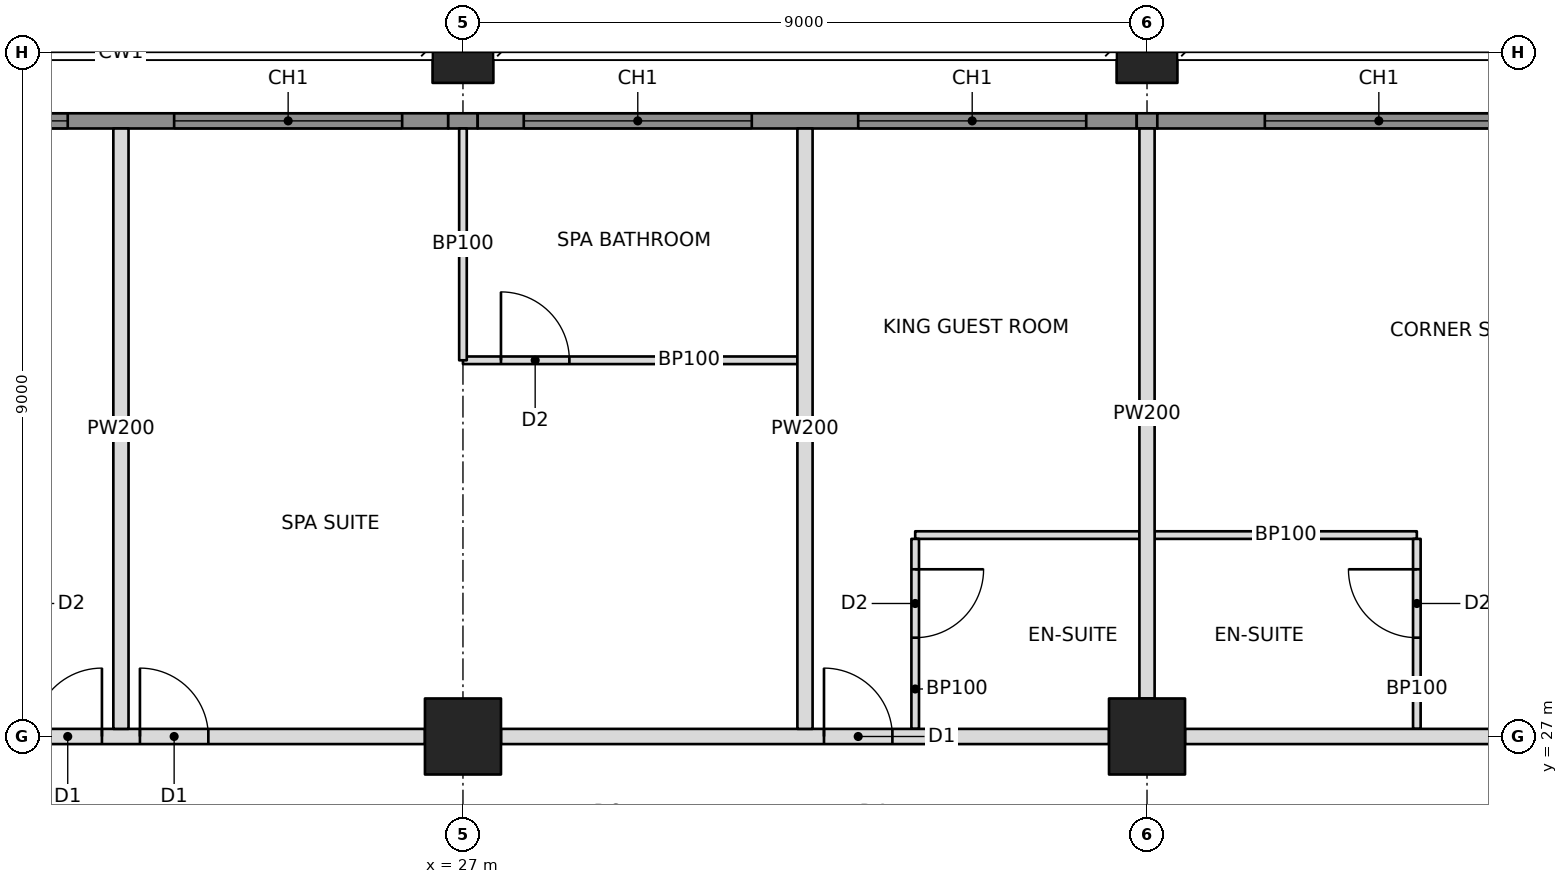
"""IFC4 building model, lengths in metres.
Left out: names, types, materials, properties, quantities, classifications, styles, units other than length and angle.
Written with IfcOpenShell. Run it as: python <this file> out.ifc"""

import sys

from ifc_helpers import new_model, si_unit, direction, frame, frame_2d, origin, origin_2d, place, context, subcontext, project, spatial, rectangle, hollow_rectangle, extrude, element, fill, save


model = new_model("IFC4")
c1 = context("Model", 3, precision=1e-05, world=origin(), true_north=direction((0.0, 1.0)))
c2 = subcontext(c1, "Body", "Model", "MODEL_VIEW")
j1 = project(units=[si_unit("LENGTHUNIT", "METRE"), si_unit("PLANEANGLEUNIT", "RADIAN")], contexts=[c1])
p1 = place(None, origin())
s1 = spatial("IfcSite", under=j1, at=p1, CompositionType="ELEMENT")
p2 = place(p1, origin())
s2 = spatial("IfcBuilding", under=s1, at=p2, CompositionType="ELEMENT")
p3 = place(p2, frame((0.0, 0.0, 97.6)))
s3 = spatial("IfcBuildingStorey", under=s2, at=p3, CompositionType="ELEMENT", Elevation=97.6)
p4 = place(p3, frame((27.0, 27.0, 0.0), z_axis=(0.0, 0.0, 1.0), x_axis=(1.0, 0.0, 0.0)))
e1 = element("IfcColumn", 1, at=p4, inside=s3, PredefinedType="COLUMN", context=c2, shape_type="SweptSolid", body=[
    extrude(hollow_rectangle(XDim=1.0, YDim=1.0, WallThickness=0.1, at=origin_2d()), origin(), (0.0, 0.0, 1.0), 3.4),
])
p5 = place(p3, frame((27.0, 36.0, 0.0), z_axis=(0.0, 0.0, 1.0), x_axis=(1.0, 0.0, 0.0)))
e2 = element("IfcColumn", 2, at=p5, inside=s3, PredefinedType="COLUMN", context=c2, shape_type="SweptSolid", body=[
    extrude(hollow_rectangle(XDim=0.8, YDim=0.8, WallThickness=0.07, at=origin_2d()), origin(), (0.0, 0.0, 1.0), 3.4),
])
p6 = place(p3, frame((36.0, 27.0, 0.0), z_axis=(0.0, 0.0, 1.0), x_axis=(1.0, 0.0, 0.0)))
e3 = element("IfcColumn", 3, at=p6, inside=s3, PredefinedType="COLUMN", context=c2, shape_type="SweptSolid", body=[
    extrude(hollow_rectangle(XDim=1.0, YDim=1.0, WallThickness=0.1, at=origin_2d()), origin(), (0.0, 0.0, 1.0), 3.4),
])
p7 = place(p3, frame((36.0, 36.0, 0.0), z_axis=(0.0, 0.0, 1.0), x_axis=(1.0, 0.0, 0.0)))
e4 = element("IfcColumn", 4, at=p7, inside=s3, PredefinedType="COLUMN", context=c2, shape_type="SweptSolid", body=[
    extrude(hollow_rectangle(XDim=0.8, YDim=0.8, WallThickness=0.07, at=origin_2d()), origin(), (0.0, 0.0, 1.0), 3.4),
])
p8 = place(p3, frame((18.5, 27.0, 0.0), z_axis=(0.0, 0.0, 1.0), x_axis=(1.0, 0.0, 0.0)))
e5 = element("IfcWall", 5, at=p8, inside=s3, PredefinedType="PARTITIONING", context=c2, shape_type="SweptSolid", body=[
    extrude(rectangle(XDim=8.0, YDim=0.2, at=frame_2d((4.0, 0.0))), origin(), (0.0, 0.0, 1.0), 2.405),
])
p9 = place(p8, frame((2.85, 0.0, 0.0)))
e6 = element("IfcOpeningElement", 6, at=p9, cuts=e5, PredefinedType="OPENING", context=c2, shape_type="SweptSolid", body=[
    extrude(rectangle(XDim=0.9, YDim=2.1, at=frame_2d((0.45, 1.05))), frame((0.0, 0.11, 0.0), z_axis=(0.0, -1.0, 0.0), x_axis=(1.0, 0.0, 0.0)), (0.0, 0.0, 1.0), 0.22),
])
p10 = place(p8, frame((4.25, 0.0, 0.0)))
e7 = element("IfcOpeningElement", 7, at=p10, cuts=e5, PredefinedType="OPENING", context=c2, shape_type="SweptSolid", body=[
    extrude(rectangle(XDim=0.9, YDim=2.1, at=frame_2d((0.45, 1.05))), frame((0.0, 0.11, 0.0), z_axis=(0.0, -1.0, 0.0), x_axis=(1.0, 0.0, 0.0)), (0.0, 0.0, 1.0), 0.22),
])
p11 = place(p3, frame((27.5, 27.0, 0.0), z_axis=(0.0, 0.0, 1.0), x_axis=(1.0, 0.0, 0.0)))
e8 = element("IfcWall", 8, at=p11, inside=s3, PredefinedType="PARTITIONING", context=c2, shape_type="SweptSolid", body=[
    extrude(rectangle(XDim=8.0, YDim=0.2, at=frame_2d((4.0, 0.0))), origin(), (0.0, 0.0, 1.0), 2.405),
])
p12 = place(p11, frame((4.25, 0.0, 0.0)))
e9 = element("IfcOpeningElement", 9, at=p12, cuts=e8, PredefinedType="OPENING", context=c2, shape_type="SweptSolid", body=[
    extrude(rectangle(XDim=0.9, YDim=2.1, at=frame_2d((0.45, 1.05))), frame((0.0, 0.11, 0.0), z_axis=(0.0, -1.0, 0.0), x_axis=(1.0, 0.0, 0.0)), (0.0, 0.0, 1.0), 0.22),
])
p13 = place(p3, frame((36.5, 27.0, 0.0), z_axis=(0.0, 0.0, 1.0), x_axis=(1.0, 0.0, 0.0)))
e10 = element("IfcWall", 10, at=p13, inside=s3, PredefinedType="PARTITIONING", context=c2, shape_type="SweptSolid", body=[
    extrude(rectangle(XDim=7.5, YDim=0.2, at=frame_2d((3.75, 0.0))), origin(), (0.0, 0.0, 1.0), 2.438),
])
p14 = place(p13, frame((6.35, 0.0, 0.0)))
e11 = element("IfcOpeningElement", 11, at=p14, cuts=e10, PredefinedType="OPENING", context=c2, shape_type="SweptSolid", body=[
    extrude(rectangle(XDim=0.9, YDim=2.1, at=frame_2d((0.45, 1.05))), frame((0.0, 0.11, 0.0), z_axis=(0.0, -1.0, 0.0), x_axis=(1.0, 0.0, 0.0)), (0.0, 0.0, 1.0), 0.22),
])
for number, where, z_axis, x_axis in (
    (12, (22.5, 27.1, 0.0), (0.0, 0.0, 1.0), (0.0, 1.0, 0.0)),
    (13, (31.5, 27.1, 0.0), (0.0, 0.0, 1.0), (0.0, 1.0, 0.0)),
):
    element("IfcWall", number, at=place(p3, frame(where, z_axis=z_axis, x_axis=x_axis)), inside=s3, PredefinedType="PARTITIONING", context=c2, shape_type="SweptSolid", body=[
        extrude(rectangle(XDim=7.9, YDim=0.2, at=frame_2d((3.95, 0.0))), origin(), (0.0, 0.0, 1.0), 2.404),
    ])
p15 = place(p3, frame((36.0, 27.5, 0.0), z_axis=(0.0, 0.0, 1.0), x_axis=(0.0, 1.0, 0.0)))
e14 = element("IfcWall", 14, at=p15, inside=s3, PredefinedType="PARTITIONING", context=c2, shape_type="SweptSolid", body=[
    extrude(rectangle(XDim=7.5, YDim=0.2, at=frame_2d((3.75, 0.0))), origin(), (0.0, 0.0, 1.0), 2.438),
])
p16 = place(p3, frame((27.0, 31.95, 0.0), z_axis=(0.0, 0.0, 1.0), x_axis=(1.0, 0.0, 0.0)))
e15 = element("IfcWall", 15, at=p16, inside=s3, PredefinedType="PARTITIONING", context=c2, shape_type="SweptSolid", body=[
    extrude(rectangle(XDim=4.4, YDim=0.1, at=frame_2d((2.2, 0.0))), origin(), (0.0, 0.0, 1.0), 2.404),
])
p17 = place(p16, frame((0.5, 0.0, 0.0)))
e16 = element("IfcOpeningElement", 16, at=p17, cuts=e15, PredefinedType="OPENING", context=c2, shape_type="SweptSolid", body=[
    extrude(rectangle(XDim=0.9, YDim=2.1, at=frame_2d((0.45, 1.05))), frame((0.0, 0.06, 0.0), z_axis=(0.0, -1.0, 0.0), x_axis=(1.0, 0.0, 0.0)), (0.0, 0.0, 1.0), 0.12),
])
p18 = place(p3, frame((27.0, 31.95, 0.0), z_axis=(0.0, 0.0, 1.0), x_axis=(0.0, 1.0, 0.0)))
e17 = element("IfcWall", 17, at=p18, inside=s3, PredefinedType="PARTITIONING", context=c2, shape_type="SweptSolid", body=[
    extrude(rectangle(XDim=3.05, YDim=0.1, at=frame_2d((1.525, 0.0))), origin(), (0.0, 0.0, 1.0), 2.405),
])
p19 = place(p3, frame((32.95, 29.65, 0.0), z_axis=(0.0, 0.0, 1.0), x_axis=(1.0, 0.0, 0.0)))
e18 = element("IfcWall", 18, at=p19, inside=s3, PredefinedType="PARTITIONING", context=c2, shape_type="SweptSolid", body=[
    extrude(rectangle(XDim=2.95, YDim=0.1, at=frame_2d((1.475, 0.0))), origin(), (0.0, 0.0, 1.0), 2.438),
])
p20 = place(p3, frame((32.95, 27.1, 0.0), z_axis=(0.0, 0.0, 1.0), x_axis=(0.0, 1.0, 0.0)))
e19 = element("IfcWall", 19, at=p20, inside=s3, PredefinedType="PARTITIONING", context=c2, shape_type="SweptSolid", body=[
    extrude(rectangle(XDim=2.5, YDim=0.1, at=frame_2d((1.25, 0.0))), origin(), (0.0, 0.0, 1.0), 2.404),
])
p21 = place(p20, frame((1.2, 0.0, 0.0)))
e20 = element("IfcOpeningElement", 20, at=p21, cuts=e19, PredefinedType="OPENING", context=c2, shape_type="SweptSolid", body=[
    extrude(rectangle(XDim=0.9, YDim=2.1, at=frame_2d((0.45, 1.05))), frame((0.0, 0.06, 0.0), z_axis=(0.0, -1.0, 0.0), x_axis=(1.0, 0.0, 0.0)), (0.0, 0.0, 1.0), 0.12),
])
p22 = place(p3, frame((36.1, 29.65, 0.0), z_axis=(0.0, 0.0, 1.0), x_axis=(1.0, 0.0, 0.0)))
e21 = element("IfcWall", 21, at=p22, inside=s3, PredefinedType="PARTITIONING", context=c2, shape_type="SweptSolid", body=[
    extrude(rectangle(XDim=3.45, YDim=0.1, at=frame_2d((1.725, 0.0))), origin(), (0.0, 0.0, 1.0), 2.438),
])
p23 = place(p3, frame((39.55, 27.1, 0.0), z_axis=(0.0, 0.0, 1.0), x_axis=(0.0, 1.0, 0.0)))
e22 = element("IfcWall", 22, at=p23, inside=s3, PredefinedType="PARTITIONING", context=c2, shape_type="SweptSolid", body=[
    extrude(rectangle(XDim=2.5, YDim=0.1, at=frame_2d((1.25, 0.0))), origin(), (0.0, 0.0, 1.0), 2.438),
])
p24 = place(p23, frame((1.2, 0.0, 0.0)))
e23 = element("IfcOpeningElement", 23, at=p24, cuts=e22, PredefinedType="OPENING", context=c2, shape_type="SweptSolid", body=[
    extrude(rectangle(XDim=0.9, YDim=2.1, at=frame_2d((0.45, 1.05))), frame((0.0, 0.06, 0.0), z_axis=(0.0, -1.0, 0.0), x_axis=(1.0, 0.0, 0.0)), (0.0, 0.0, 1.0), 0.12),
])
p25 = place(p3, frame((18.194, 35.1, 0.0), z_axis=(0.0, 0.0, 1.0), x_axis=(1.0, 0.0, 0.0)))
e24 = element("IfcWall", 24, at=p25, inside=s3, PredefinedType="SOLIDWALL", context=c2, shape_type="SweptSolid", body=[
    extrude(rectangle(XDim=8.612, YDim=0.2, at=frame_2d((4.306, 0.0))), origin(), (0.0, 0.0, 1.0), 3.2),
])
p26 = place(p25, frame((0.606, 0.0, 0.6)))
e25 = element("IfcOpeningElement", 25, at=p26, cuts=e24, PredefinedType="OPENING", context=c2, shape_type="SweptSolid", body=[
    extrude(rectangle(XDim=3.0, YDim=2.2, at=frame_2d((1.5, 1.1))), frame((0.0, 0.11, 0.0), z_axis=(0.0, -1.0, 0.0), x_axis=(1.0, 0.0, 0.0)), (0.0, 0.0, 1.0), 0.22),
])
p27 = place(p25, frame((5.006, 0.0, 0.6)))
e26 = element("IfcOpeningElement", 26, at=p27, cuts=e24, PredefinedType="OPENING", context=c2, shape_type="SweptSolid", body=[
    extrude(rectangle(XDim=3.0, YDim=2.2, at=frame_2d((1.5, 1.1))), frame((0.0, 0.11, 0.0), z_axis=(0.0, -1.0, 0.0), x_axis=(1.0, 0.0, 0.0)), (0.0, 0.0, 1.0), 0.22),
])
p28 = place(p3, frame((26.806, 35.1, 0.0), z_axis=(0.0, 0.0, 1.0), x_axis=(1.0, 0.0, 0.0)))
e27 = element("IfcWall", 27, at=p28, inside=s3, PredefinedType="SOLIDWALL", context=c2, shape_type="SweptSolid", body=[
    extrude(rectangle(XDim=0.388, YDim=0.2, at=frame_2d((0.194, 0.0))), origin(), (0.0, 0.0, 1.0), 2.404),
])
p29 = place(p3, frame((27.194, 35.1, 0.0), z_axis=(0.0, 0.0, 1.0), x_axis=(1.0, 0.0, 0.0)))
e28 = element("IfcWall", 28, at=p29, inside=s3, PredefinedType="SOLIDWALL", context=c2, shape_type="SweptSolid", body=[
    extrude(rectangle(XDim=8.671, YDim=0.2, at=frame_2d((4.335, 0.0))), origin(), (0.0, 0.0, 1.0), 3.2),
])
p30 = place(p29, frame((0.606, 0.0, 0.6)))
e29 = element("IfcOpeningElement", 29, at=p30, cuts=e28, PredefinedType="OPENING", context=c2, shape_type="SweptSolid", body=[
    extrude(rectangle(XDim=3.0, YDim=2.2, at=frame_2d((1.5, 1.1))), frame((0.0, 0.11, 0.0), z_axis=(0.0, -1.0, 0.0), x_axis=(1.0, 0.0, 0.0)), (0.0, 0.0, 1.0), 0.22),
])
p31 = place(p29, frame((5.006, 0.0, 0.6)))
e30 = element("IfcOpeningElement", 30, at=p31, cuts=e28, PredefinedType="OPENING", context=c2, shape_type="SweptSolid", body=[
    extrude(rectangle(XDim=3.0, YDim=2.2, at=frame_2d((1.5, 1.1))), frame((0.0, 0.11, 0.0), z_axis=(0.0, -1.0, 0.0), x_axis=(1.0, 0.0, 0.0)), (0.0, 0.0, 1.0), 0.22),
])
p32 = place(p3, frame((35.865, 35.1, 0.0), z_axis=(0.0, 0.0, 1.0), x_axis=(1.0, 0.0, 0.0)))
e31 = element("IfcWall", 31, at=p32, inside=s3, PredefinedType="SOLIDWALL", context=c2, shape_type="SweptSolid", body=[
    extrude(rectangle(XDim=0.271, YDim=0.2, at=frame_2d((0.135, 0.0))), origin(), (0.0, 0.0, 1.0), 2.438),
])
p33 = place(p3, frame((36.135, 35.1, 0.0), z_axis=(0.0, 0.0, 1.0), x_axis=(1.0, 0.0, 0.0)))
e32 = element("IfcWall", 32, at=p33, inside=s3, PredefinedType="SOLIDWALL", context=c2, shape_type="SweptSolid", body=[
    extrude(rectangle(XDim=5.865, YDim=0.2, at=frame_2d((2.932, 0.0))), origin(), (0.0, 0.0, 1.0), 3.2),
])
p34 = place(p33, frame((1.415, 0.0, 0.6)))
e33 = element("IfcOpeningElement", 33, at=p34, cuts=e32, PredefinedType="OPENING", context=c2, shape_type="SweptSolid", body=[
    extrude(rectangle(XDim=3.0, YDim=2.2, at=frame_2d((1.5, 1.1))), frame((0.0, 0.11, 0.0), z_axis=(0.0, -1.0, 0.0), x_axis=(1.0, 0.0, 0.0)), (0.0, 0.0, 1.0), 0.22),
])
p35 = place(p26, origin())
e34 = element("IfcWindow", 34, at=p35, inside=s3, PartitioningType="TRIPLE_PANEL_VERTICAL", PredefinedType="WINDOW", context=c2, shape_type="SweptSolid", body=[
    extrude(rectangle(XDim=3.0, YDim=2.2, at=frame_2d((1.5, 1.1))), frame((0.0, 0.03, 0.0), z_axis=(0.0, -1.0, 0.0), x_axis=(1.0, 0.0, 0.0)), (0.0, 0.0, 1.0), 0.06),
])
fill(e25, e34)
p36 = place(p27, origin())
e35 = element("IfcWindow", 35, at=p36, inside=s3, PartitioningType="TRIPLE_PANEL_VERTICAL", PredefinedType="WINDOW", context=c2, shape_type="SweptSolid", body=[
    extrude(rectangle(XDim=3.0, YDim=2.2, at=frame_2d((1.5, 1.1))), frame((0.0, 0.03, 0.0), z_axis=(0.0, -1.0, 0.0), x_axis=(1.0, 0.0, 0.0)), (0.0, 0.0, 1.0), 0.06),
])
fill(e26, e35)
p37 = place(p30, origin())
e36 = element("IfcWindow", 36, at=p37, inside=s3, PartitioningType="TRIPLE_PANEL_VERTICAL", PredefinedType="WINDOW", context=c2, shape_type="SweptSolid", body=[
    extrude(rectangle(XDim=3.0, YDim=2.2, at=frame_2d((1.5, 1.1))), frame((0.0, 0.03, 0.0), z_axis=(0.0, -1.0, 0.0), x_axis=(1.0, 0.0, 0.0)), (0.0, 0.0, 1.0), 0.06),
])
fill(e29, e36)
p38 = place(p31, origin())
e37 = element("IfcWindow", 37, at=p38, inside=s3, PartitioningType="TRIPLE_PANEL_VERTICAL", PredefinedType="WINDOW", context=c2, shape_type="SweptSolid", body=[
    extrude(rectangle(XDim=3.0, YDim=2.2, at=frame_2d((1.5, 1.1))), frame((0.0, 0.03, 0.0), z_axis=(0.0, -1.0, 0.0), x_axis=(1.0, 0.0, 0.0)), (0.0, 0.0, 1.0), 0.06),
])
fill(e30, e37)
p39 = place(p34, origin())
e38 = element("IfcWindow", 38, at=p39, inside=s3, PartitioningType="TRIPLE_PANEL_VERTICAL", PredefinedType="WINDOW", context=c2, shape_type="SweptSolid", body=[
    extrude(rectangle(XDim=3.0, YDim=2.2, at=frame_2d((1.5, 1.1))), frame((0.0, 0.03, 0.0), z_axis=(0.0, -1.0, 0.0), x_axis=(1.0, 0.0, 0.0)), (0.0, 0.0, 1.0), 0.06),
])
fill(e33, e38)
p40 = place(p9, origin())
e39 = element("IfcDoor", 39, at=p40, inside=s3, OperationType="SINGLE_SWING_RIGHT", PredefinedType="DOOR", context=c2, shape_type="SweptSolid", body=[
    extrude(rectangle(XDim=0.9, YDim=2.1, at=frame_2d((0.45, 1.05))), frame((0.0, 0.025, 0.0), z_axis=(0.0, -1.0, 0.0), x_axis=(1.0, 0.0, 0.0)), (0.0, 0.0, 1.0), 0.05),
])
fill(e6, e39)
p41 = place(p17, origin())
e40 = element("IfcDoor", 40, at=p41, inside=s3, OperationType="SINGLE_SWING_LEFT", PredefinedType="DOOR", context=c2, shape_type="SweptSolid", body=[
    extrude(rectangle(XDim=0.9, YDim=2.1, at=frame_2d((0.45, 1.05))), frame((0.0, 0.025, 0.0), z_axis=(0.0, -1.0, 0.0), x_axis=(1.0, 0.0, 0.0)), (0.0, 0.0, 1.0), 0.05),
])
fill(e16, e40)
p42 = place(p10, origin())
e41 = element("IfcDoor", 41, at=p42, inside=s3, OperationType="SINGLE_SWING_LEFT", PredefinedType="DOOR", context=c2, shape_type="SweptSolid", body=[
    extrude(rectangle(XDim=0.9, YDim=2.1, at=frame_2d((0.45, 1.05))), frame((0.0, 0.025, 0.0), z_axis=(0.0, -1.0, 0.0), x_axis=(1.0, 0.0, 0.0)), (0.0, 0.0, 1.0), 0.05),
])
fill(e7, e41)
p43 = place(p21, frame((0.9, 0.0, 0.0), z_axis=(0.0, 0.0, 1.0), x_axis=(-1.0, 0.0, 0.0)))
e42 = element("IfcDoor", 42, at=p43, inside=s3, OperationType="SINGLE_SWING_LEFT", PredefinedType="DOOR", context=c2, shape_type="SweptSolid", body=[
    extrude(rectangle(XDim=0.9, YDim=2.1, at=frame_2d((0.45, 1.05))), frame((0.0, 0.025, 0.0), z_axis=(0.0, -1.0, 0.0), x_axis=(1.0, 0.0, 0.0)), (0.0, 0.0, 1.0), 0.05),
])
fill(e20, e42)
p44 = place(p12, origin())
e43 = element("IfcDoor", 43, at=p44, inside=s3, OperationType="SINGLE_SWING_LEFT", PredefinedType="DOOR", context=c2, shape_type="SweptSolid", body=[
    extrude(rectangle(XDim=0.9, YDim=2.1, at=frame_2d((0.45, 1.05))), frame((0.0, 0.025, 0.0), z_axis=(0.0, -1.0, 0.0), x_axis=(1.0, 0.0, 0.0)), (0.0, 0.0, 1.0), 0.05),
])
fill(e9, e43)
p45 = place(p24, origin())
e44 = element("IfcDoor", 44, at=p45, inside=s3, OperationType="SINGLE_SWING_RIGHT", PredefinedType="DOOR", context=c2, shape_type="SweptSolid", body=[
    extrude(rectangle(XDim=0.9, YDim=2.1, at=frame_2d((0.45, 1.05))), frame((0.0, 0.025, 0.0), z_axis=(0.0, -1.0, 0.0), x_axis=(1.0, 0.0, 0.0)), (0.0, 0.0, 1.0), 0.05),
])
fill(e23, e44)
save(model, sys.argv[1])
